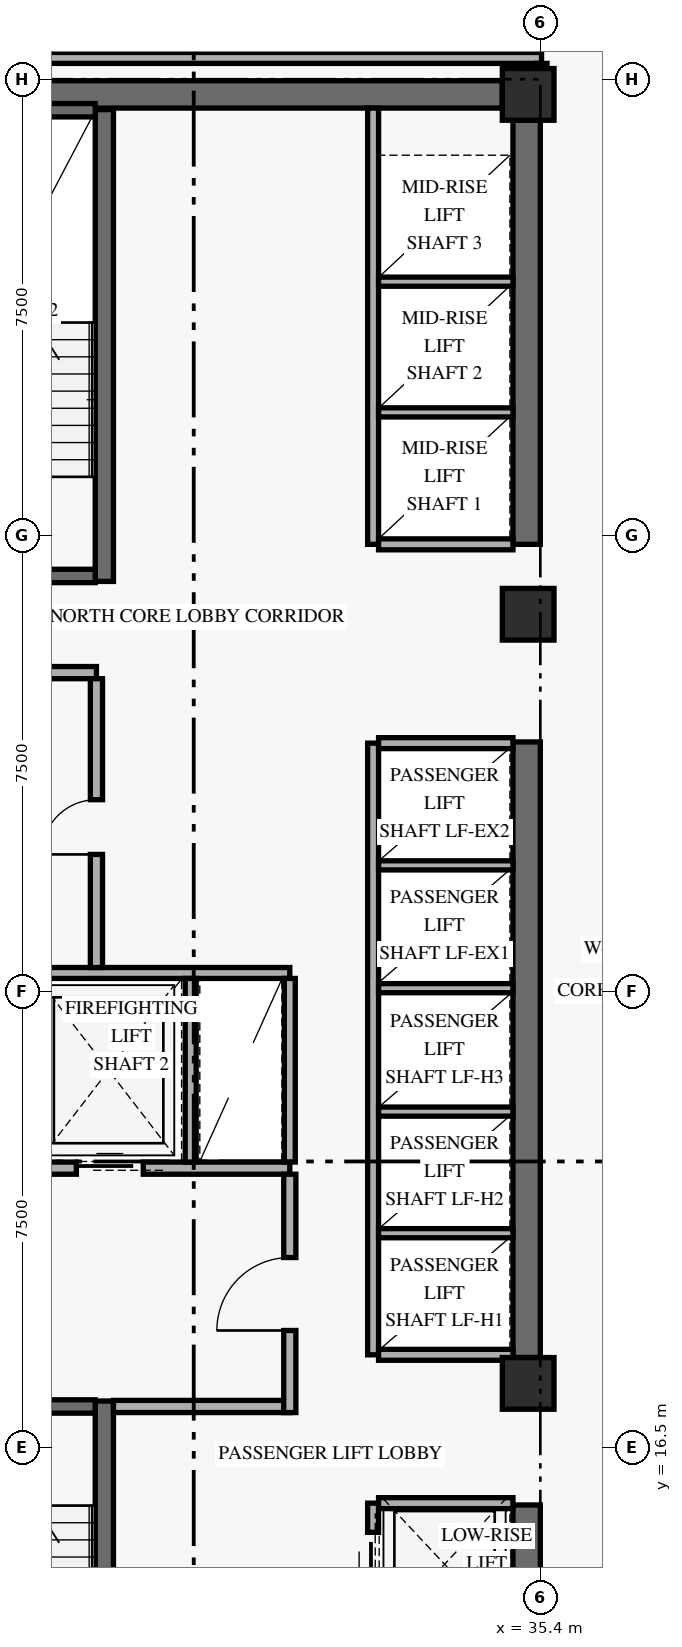
"""IFC4 building model, lengths in metres.
Left out: names, types, materials, properties, quantities, classifications, styles, units other than length and angle.
Written with IfcOpenShell. Run it as: python <this file> out.ifc"""

import sys

from ifc_helpers import new_model, si_unit, direction, frame, frame_2d, origin, origin_2d, place, context, subcontext, project, spatial, rectangle, extrude, element, fill, save


model = new_model("IFC4")
c1 = context("Model", 3, precision=1e-05, world=origin(), true_north=direction((0.0, 1.0)))
c2 = subcontext(c1, "Body", "Model", "MODEL_VIEW")
j1 = project(units=[si_unit("LENGTHUNIT", "METRE"), si_unit("PLANEANGLEUNIT", "RADIAN")], contexts=[c1])
p1 = place(None, origin())
s1 = spatial("IfcSite", under=j1, at=p1, CompositionType="ELEMENT")
p2 = place(p1, origin())
s2 = spatial("IfcBuilding", under=s1, at=p2, CompositionType="ELEMENT")
p3 = place(p2, frame((0.0, 0.0, 24.0)))
s3 = spatial("IfcBuildingStorey", under=s2, at=p3, CompositionType="ELEMENT", Elevation=24.0)
p4 = place(p3, frame((35.175, 9.675, 0.0), z_axis=(0.0, 0.0, 1.0), x_axis=(0.0, 1.0, 0.0)))
e1 = element("IfcWall", 1, at=p4, inside=s3, PredefinedType="SHEAR", context=c2, shape_type="SweptSolid", body=[
    extrude(rectangle(XDim=5.875, YDim=0.45, at=frame_2d((2.938, 0.0))), origin(), (0.0, 0.0, 1.0), 2.667),
])
p5 = place(p3, frame((35.175, 17.975, 0.0), z_axis=(0.0, 0.0, 1.0), x_axis=(0.0, 1.0, 0.0)))
e2 = element("IfcWall", 2, at=p5, inside=s3, PredefinedType="SHEAR", context=c2, shape_type="SweptSolid", body=[
    extrude(rectangle(XDim=10.125, YDim=0.45, at=frame_2d((5.062, 0.0))), origin(), (0.0, 0.0, 1.0), 2.667),
])
p6 = place(p3, frame((35.175, 31.35, 0.0), z_axis=(0.0, 0.0, 1.0), x_axis=(0.0, 1.0, 0.0)))
e3 = element("IfcWall", 3, at=p6, inside=s3, PredefinedType="SHEAR", context=c2, shape_type="SweptSolid", body=[
    extrude(rectangle(XDim=6.975, YDim=0.45, at=frame_2d((3.487, 0.0))), origin(), (0.0, 0.0, 1.0), 2.667),
])
p7 = place(p3, frame((24.625, 38.75, 0.0), z_axis=(0.0, 0.0, 1.0), x_axis=(1.0, 0.0, 0.0)))
e4 = element("IfcWall", 4, at=p7, inside=s3, PredefinedType="SHEAR", context=c2, shape_type="SweptSolid", body=[
    extrude(rectangle(XDim=10.15, YDim=0.45, at=frame_2d((5.075, 0.0))), origin(), (0.0, 0.0, 1.0), 3.36),
])
p8 = place(p3, frame((28.23, 9.5, 0.0), z_axis=(0.0, 0.0, 1.0), x_axis=(0.0, 1.0, 0.0)))
e5 = element("IfcWall", 5, at=p8, inside=s3, PredefinedType="SHEAR", context=c2, shape_type="SweptSolid", body=[
    extrude(rectangle(XDim=7.76, YDim=0.3, at=frame_2d((3.88, 0.0))), origin(), (0.0, 0.0, 1.0), 3.36),
])
p9 = place(p3, frame((24.92, 17.17, 0.0), z_axis=(0.0, 0.0, 1.0), x_axis=(1.0, 0.0, 0.0)))
e6 = element("IfcWall", 6, at=p9, inside=s3, PredefinedType="SHEAR", context=c2, shape_type="SweptSolid", body=[
    extrude(rectangle(XDim=3.16, YDim=0.22, at=frame_2d((1.58, 0.0))), origin(), (0.0, 0.0, 1.0), 3.36),
])
p10 = place(p9, frame((0.78, 0.0, 0.0)))
e7 = element("IfcOpeningElement", 7, at=p10, cuts=e6, PredefinedType="OPENING", context=c2, shape_type="SweptSolid", body=[
    extrude(rectangle(XDim=1.05, YDim=2.15, at=frame_2d((0.525, 1.075))), frame((0.0, 0.12, 0.0), z_axis=(0.0, -1.0, 0.0), x_axis=(1.0, 0.0, 0.0)), (0.0, 0.0, 1.0), 0.24),
])
p11 = place(p3, frame((28.23, 30.74, 0.0), z_axis=(0.0, 0.0, 1.0), x_axis=(0.0, 1.0, 0.0)))
e8 = element("IfcWall", 8, at=p11, inside=s3, PredefinedType="SHEAR", context=c2, shape_type="SweptSolid", body=[
    extrude(rectangle(XDim=7.76, YDim=0.3, at=frame_2d((3.88, 0.0))), origin(), (0.0, 0.0, 1.0), 3.36),
])
p12 = place(p3, frame((24.92, 30.83, 0.0), z_axis=(0.0, 0.0, 1.0), x_axis=(1.0, 0.0, 0.0)))
e9 = element("IfcWall", 9, at=p12, inside=s3, PredefinedType="SHEAR", context=c2, shape_type="SweptSolid", body=[
    extrude(rectangle(XDim=3.16, YDim=0.22, at=frame_2d((1.58, 0.0))), origin(), (0.0, 0.0, 1.0), 3.36),
])
p13 = place(p12, frame((0.78, 0.0, 0.0)))
e10 = element("IfcOpeningElement", 10, at=p13, cuts=e9, PredefinedType="OPENING", context=c2, shape_type="SweptSolid", body=[
    extrude(rectangle(XDim=1.05, YDim=2.15, at=frame_2d((0.525, 1.075))), frame((0.0, 0.12, 0.0), z_axis=(0.0, -1.0, 0.0), x_axis=(1.0, 0.0, 0.0)), (0.0, 0.0, 1.0), 0.24),
])
p14 = place(p3, frame((24.92, 38.49, 0.0), z_axis=(0.0, 0.0, 1.0), x_axis=(1.0, 0.0, 0.0)))
e11 = element("IfcWall", 11, at=p14, inside=s3, PredefinedType="SHEAR", context=c2, shape_type="SweptSolid", body=[
    extrude(rectangle(XDim=3.16, YDim=0.22, at=frame_2d((1.58, 0.0))), origin(), (0.0, 0.0, 1.0), 3.36),
])
for number, where, z_axis, x_axis in (
    (12, (35.2, 17.55, 0.0), (0.0, 0.0, 1.0), (1.0, 0.0, 0.0)),
    (13, (35.2, 30.2, 0.0), (0.0, 0.0, 1.0), (1.0, 0.0, 0.0)),
    (14, (35.2, 38.75, 0.0), (0.0, 0.0, 1.0), (1.0, 0.0, 0.0)),
):
    element("IfcColumn", number, at=place(p3, frame(where, z_axis=z_axis, x_axis=x_axis)), inside=s3, PredefinedType="COLUMN", context=c2, shape_type="SweptSolid", body=[
        extrude(rectangle(XDim=0.85, YDim=0.85, at=origin_2d()), origin(), (0.0, 0.0, 1.0), 3.6),
    ])
p15 = place(p3, frame((24.45, 21.09, 0.0), z_axis=(0.0, 0.0, 1.0), x_axis=(1.0, 0.0, 0.0)))
e15 = element("IfcWall", 15, at=p15, inside=s3, PredefinedType="STANDARD", context=c2, shape_type="SweptSolid", body=[
    extrude(rectangle(XDim=6.83, YDim=0.2, at=frame_2d((3.415, 0.0))), origin(), (0.0, 0.0, 1.0), 3.36),
])
p16 = place(p15, frame((0.72, 0.0, 0.0)))
e16 = element("IfcOpeningElement", 16, at=p16, cuts=e15, PredefinedType="OPENING", context=c2, shape_type="SweptSolid", body=[
    extrude(rectangle(XDim=1.1, YDim=2.2, at=frame_2d((0.55, 1.1))), frame((0.0, 0.11, 0.0), z_axis=(0.0, -1.0, 0.0), x_axis=(1.0, 0.0, 0.0)), (0.0, 0.0, 1.0), 0.22),
])
p17 = place(p15, frame((3.32, 0.0, 0.0)))
e17 = element("IfcOpeningElement", 17, at=p17, cuts=e15, PredefinedType="OPENING", context=c2, shape_type="SweptSolid", body=[
    extrude(rectangle(XDim=1.1, YDim=2.2, at=frame_2d((0.55, 1.1))), frame((0.0, 0.11, 0.0), z_axis=(0.0, -1.0, 0.0), x_axis=(1.0, 0.0, 0.0)), (0.0, 0.0, 1.0), 0.22),
])
p18 = place(p3, frame((28.38, 17.17, 0.0), z_axis=(0.0, 0.0, 1.0), x_axis=(1.0, 0.0, 0.0)))
e18 = element("IfcWall", 18, at=p18, inside=s3, PredefinedType="STANDARD", context=c2, shape_type="SweptSolid", body=[
    extrude(rectangle(XDim=2.9, YDim=0.2, at=frame_2d((1.45, 0.0))), origin(), (0.0, 0.0, 1.0), 3.36),
])
p19 = place(p3, frame((31.28, 17.07, 0.0), z_axis=(0.0, 0.0, 1.0), x_axis=(0.0, 1.0, 0.0)))
e19 = element("IfcWall", 19, at=p19, inside=s3, PredefinedType="STANDARD", context=c2, shape_type="SweptSolid", body=[
    extrude(rectangle(XDim=3.92, YDim=0.2, at=frame_2d((1.96, 0.0))), origin(), (0.0, 0.0, 1.0), 2.649),
])
p20 = place(p19, frame((1.35, 0.0, 0.0)))
e20 = element("IfcOpeningElement", 20, at=p20, cuts=e19, PredefinedType="OPENING", context=c2, shape_type="SweptSolid", body=[
    extrude(rectangle(XDim=1.2, YDim=2.15, at=frame_2d((0.6, 1.075))), frame((0.0, 0.11, 0.0), z_axis=(0.0, -1.0, 0.0), x_axis=(1.0, 0.0, 0.0)), (0.0, 0.0, 1.0), 0.22),
])
p21 = place(p3, frame((24.45, 24.3, 0.0), z_axis=(0.0, 0.0, 1.0), x_axis=(1.0, 0.0, 0.0)))
e21 = element("IfcWall", 21, at=p21, inside=s3, PredefinedType="STANDARD", context=c2, shape_type="SweptSolid", body=[
    extrude(rectangle(XDim=6.83, YDim=0.18, at=frame_2d((3.415, 0.0))), origin(), (0.0, 0.0, 1.0), 3.36),
])
for number, where, z_axis, x_axis in (
    (22, (29.65, 21.19, 0.0), (0.0, 0.0, 1.0), (0.0, 1.0, 0.0)),
    (23, (31.28, 21.19, 0.0), (0.0, 0.0, 1.0), (0.0, 1.0, 0.0)),
):
    element("IfcWall", number, at=place(p3, frame(where, z_axis=z_axis, x_axis=x_axis)), inside=s3, PredefinedType="STANDARD", context=c2, shape_type="SweptSolid", body=[
        extrude(rectangle(XDim=3.02, YDim=0.18, at=frame_2d((1.51, 0.0))), origin(), (0.0, 0.0, 1.0), 3.36),
    ])
p22 = place(p3, frame((24.45, 29.24, 0.0), z_axis=(0.0, 0.0, 1.0), x_axis=(1.0, 0.0, 0.0)))
e24 = element("IfcWall", 24, at=p22, inside=s3, PredefinedType="STANDARD", context=c2, shape_type="SweptSolid", body=[
    extrude(rectangle(XDim=3.65, YDim=0.2, at=frame_2d((1.825, 0.0))), origin(), (0.0, 0.0, 1.0), 3.36),
])
p23 = place(p3, frame((28.1, 24.39, 0.0), z_axis=(0.0, 0.0, 1.0), x_axis=(0.0, 1.0, 0.0)))
e25 = element("IfcWall", 25, at=p23, inside=s3, PredefinedType="STANDARD", context=c2, shape_type="SweptSolid", body=[
    extrude(rectangle(XDim=4.75, YDim=0.2, at=frame_2d((2.375, 0.0))), origin(), (0.0, 0.0, 1.0), 3.36),
])
p24 = place(p23, frame((1.86, 0.0, 0.0)))
e26 = element("IfcOpeningElement", 26, at=p24, cuts=e25, PredefinedType="OPENING", context=c2, shape_type="SweptSolid", body=[
    extrude(rectangle(XDim=0.9, YDim=2.1, at=frame_2d((0.45, 1.05))), frame((0.0, 0.11, 0.0), z_axis=(0.0, -1.0, 0.0), x_axis=(1.0, 0.0, 0.0)), (0.0, 0.0, 1.0), 0.22),
])
p25 = place(p3, frame((32.65, 9.5, 0.0), z_axis=(0.0, 0.0, 1.0), x_axis=(0.0, 1.0, 0.0)))
e27 = element("IfcWall", 27, at=p25, inside=s3, PredefinedType="STANDARD", context=c2, shape_type="SweptSolid", body=[
    extrude(rectangle(XDim=6.08, YDim=0.18, at=frame_2d((3.04, 0.0))), origin(), (0.0, 0.0, 1.0), 3.36),
])
p26 = place(p25, frame((0.55, 0.0, 0.0)))
e28 = element("IfcOpeningElement", 28, at=p26, cuts=e27, PredefinedType="OPENING", context=c2, shape_type="SweptSolid", body=[
    extrude(rectangle(XDim=1.05, YDim=2.2, at=frame_2d((0.525, 1.1))), frame((0.0, 0.1, 0.0), z_axis=(0.0, -1.0, 0.0), x_axis=(1.0, 0.0, 0.0)), (0.0, 0.0, 1.0), 0.2),
])
p27 = place(p25, frame((2.55, 0.0, 0.0)))
e29 = element("IfcOpeningElement", 29, at=p27, cuts=e27, PredefinedType="OPENING", context=c2, shape_type="SweptSolid", body=[
    extrude(rectangle(XDim=1.05, YDim=2.2, at=frame_2d((0.525, 1.1))), frame((0.0, 0.1, 0.0), z_axis=(0.0, -1.0, 0.0), x_axis=(1.0, 0.0, 0.0)), (0.0, 0.0, 1.0), 0.2),
])
p28 = place(p25, frame((4.55, 0.0, 0.0)))
e30 = element("IfcOpeningElement", 30, at=p28, cuts=e27, PredefinedType="OPENING", context=c2, shape_type="SweptSolid", body=[
    extrude(rectangle(XDim=1.05, YDim=2.2, at=frame_2d((0.525, 1.1))), frame((0.0, 0.1, 0.0), z_axis=(0.0, -1.0, 0.0), x_axis=(1.0, 0.0, 0.0)), (0.0, 0.0, 1.0), 0.2),
])
p29 = place(p3, frame((32.74, 15.58, 0.0), z_axis=(0.0, 0.0, 1.0), x_axis=(1.0, 0.0, 0.0)))
e31 = element("IfcWall", 31, at=p29, inside=s3, PredefinedType="STANDARD", context=c2, shape_type="SweptSolid", body=[
    extrude(rectangle(XDim=2.21, YDim=0.18, at=frame_2d((1.105, 0.0))), origin(), (0.0, 0.0, 1.0), 3.36),
])
p30 = place(p3, frame((32.65, 18.02, 0.0), z_axis=(0.0, 0.0, 1.0), x_axis=(0.0, 1.0, 0.0)))
e32 = element("IfcWall", 32, at=p30, inside=s3, PredefinedType="STANDARD", context=c2, shape_type="SweptSolid", body=[
    extrude(rectangle(XDim=10.06, YDim=0.18, at=frame_2d((5.03, 0.0))), origin(), (0.0, 0.0, 1.0), 3.36),
])
for number, where, z_axis, x_axis in (
    (33, (32.74, 18.02, 0.0), (0.0, 0.0, 1.0), (1.0, 0.0, 0.0)),
    (34, (32.74, 28.08, 0.0), (0.0, 0.0, 1.0), (1.0, 0.0, 0.0)),
):
    element("IfcWall", number, at=place(p3, frame(where, z_axis=z_axis, x_axis=x_axis)), inside=s3, PredefinedType="STANDARD", context=c2, shape_type="SweptSolid", body=[
        extrude(rectangle(XDim=2.21, YDim=0.18, at=frame_2d((1.105, 0.0))), origin(), (0.0, 0.0, 1.0), 3.36),
    ])
for number, where, z_axis, x_axis in (
    (35, (32.74, 20.02, 0.0), (0.0, 0.0, 1.0), (1.0, 0.0, 0.0)),
    (36, (32.74, 22.02, 0.0), (0.0, 0.0, 1.0), (1.0, 0.0, 0.0)),
    (37, (32.74, 24.05, 0.0), (0.0, 0.0, 1.0), (1.0, 0.0, 0.0)),
    (38, (32.74, 26.07, 0.0), (0.0, 0.0, 1.0), (1.0, 0.0, 0.0)),
):
    element("IfcWall", number, at=place(p3, frame(where, z_axis=z_axis, x_axis=x_axis)), inside=s3, PredefinedType="STANDARD", context=c2, shape_type="SweptSolid", body=[
        extrude(rectangle(XDim=2.21, YDim=0.15, at=frame_2d((1.105, 0.0))), origin(), (0.0, 0.0, 1.0), 3.36),
    ])
p31 = place(p3, frame((32.65, 31.35, 0.0), z_axis=(0.0, 0.0, 1.0), x_axis=(0.0, 1.0, 0.0)))
e39 = element("IfcWall", 39, at=p31, inside=s3, PredefinedType="STANDARD", context=c2, shape_type="SweptSolid", body=[
    extrude(rectangle(XDim=7.175, YDim=0.18, at=frame_2d((3.587, 0.0))), origin(), (0.0, 0.0, 1.0), 3.36),
])
p32 = place(p3, frame((32.74, 31.35, 0.0), z_axis=(0.0, 0.0, 1.0), x_axis=(1.0, 0.0, 0.0)))
e40 = element("IfcWall", 40, at=p32, inside=s3, PredefinedType="STANDARD", context=c2, shape_type="SweptSolid", body=[
    extrude(rectangle(XDim=2.21, YDim=0.18, at=frame_2d((1.105, 0.0))), origin(), (0.0, 0.0, 1.0), 3.36),
])
for number, where, z_axis, x_axis in (
    (41, (32.74, 33.52, 0.0), (0.0, 0.0, 1.0), (1.0, 0.0, 0.0)),
    (42, (32.74, 35.67, 0.0), (0.0, 0.0, 1.0), (1.0, 0.0, 0.0)),
):
    element("IfcWall", number, at=place(p3, frame(where, z_axis=z_axis, x_axis=x_axis)), inside=s3, PredefinedType="STANDARD", context=c2, shape_type="SweptSolid", body=[
        extrude(rectangle(XDim=2.21, YDim=0.15, at=frame_2d((1.105, 0.0))), origin(), (0.0, 0.0, 1.0), 3.36),
    ])
p33 = place(p3, frame((23.75, 39.35, 0.0), z_axis=(0.0, 0.0, 1.0), x_axis=(1.0, 0.0, 0.0)))
e43 = element("IfcWall", 43, at=p33, inside=s3, PredefinedType="STANDARD", context=c2, shape_type="SweptSolid", body=[
    extrude(rectangle(XDim=11.67, YDim=0.18, at=frame_2d((5.835, 0.0))), origin(), (0.0, 0.0, 1.0), 2.649),
])
p34 = place(p3, frame((35.42, 38.75, 0.0), z_axis=(0.0, 0.0, 1.0), x_axis=(0.0, 1.0, 0.0)))
e44 = element("IfcWall", 44, at=p34, inside=s3, PredefinedType="STANDARD", context=c2, shape_type="SweptSolid", body=[
    extrude(rectangle(XDim=0.51, YDim=0.18, at=frame_2d((0.255, 0.0))), origin(), (0.0, 0.0, 1.0), 3.36),
])
p35 = place(p17, origin())
e45 = element("IfcDoor", 45, at=p35, inside=s3, OperationType="SLIDING_TO_LEFT", PredefinedType="DOOR", context=c2, shape_type="SweptSolid", body=[
    extrude(rectangle(XDim=1.1, YDim=2.2, at=frame_2d((0.55, 1.1))), frame((0.0, 0.025, 0.0), z_axis=(0.0, -1.0, 0.0), x_axis=(1.0, 0.0, 0.0)), (0.0, 0.0, 1.0), 0.05),
])
fill(e17, e45)
p36 = place(p20, origin())
e46 = element("IfcDoor", 46, at=p36, inside=s3, OperationType="SINGLE_SWING_LEFT", PredefinedType="DOOR", context=c2, shape_type="SweptSolid", body=[
    extrude(rectangle(XDim=1.2, YDim=2.15, at=frame_2d((0.6, 1.075))), frame((0.0, 0.025, 0.0), z_axis=(0.0, -1.0, 0.0), x_axis=(1.0, 0.0, 0.0)), (0.0, 0.0, 1.0), 0.05),
])
fill(e20, e46)
p37 = place(p24, origin())
e47 = element("IfcDoor", 47, at=p37, inside=s3, OperationType="SINGLE_SWING_LEFT", PredefinedType="DOOR", context=c2, shape_type="SweptSolid", body=[
    extrude(rectangle(XDim=0.9, YDim=2.1, at=frame_2d((0.45, 1.05))), frame((0.0, 0.025, 0.0), z_axis=(0.0, -1.0, 0.0), x_axis=(1.0, 0.0, 0.0)), (0.0, 0.0, 1.0), 0.05),
])
fill(e26, e47)
p38 = place(p28, origin())
e48 = element("IfcDoor", 48, at=p38, inside=s3, OperationType="SLIDING_TO_LEFT", PredefinedType="DOOR", context=c2, shape_type="SweptSolid", body=[
    extrude(rectangle(XDim=1.05, YDim=2.2, at=frame_2d((0.525, 1.1))), frame((0.0, 0.025, 0.0), z_axis=(0.0, -1.0, 0.0), x_axis=(1.0, 0.0, 0.0)), (0.0, 0.0, 1.0), 0.05),
])
fill(e30, e48)
save(model, sys.argv[1])
